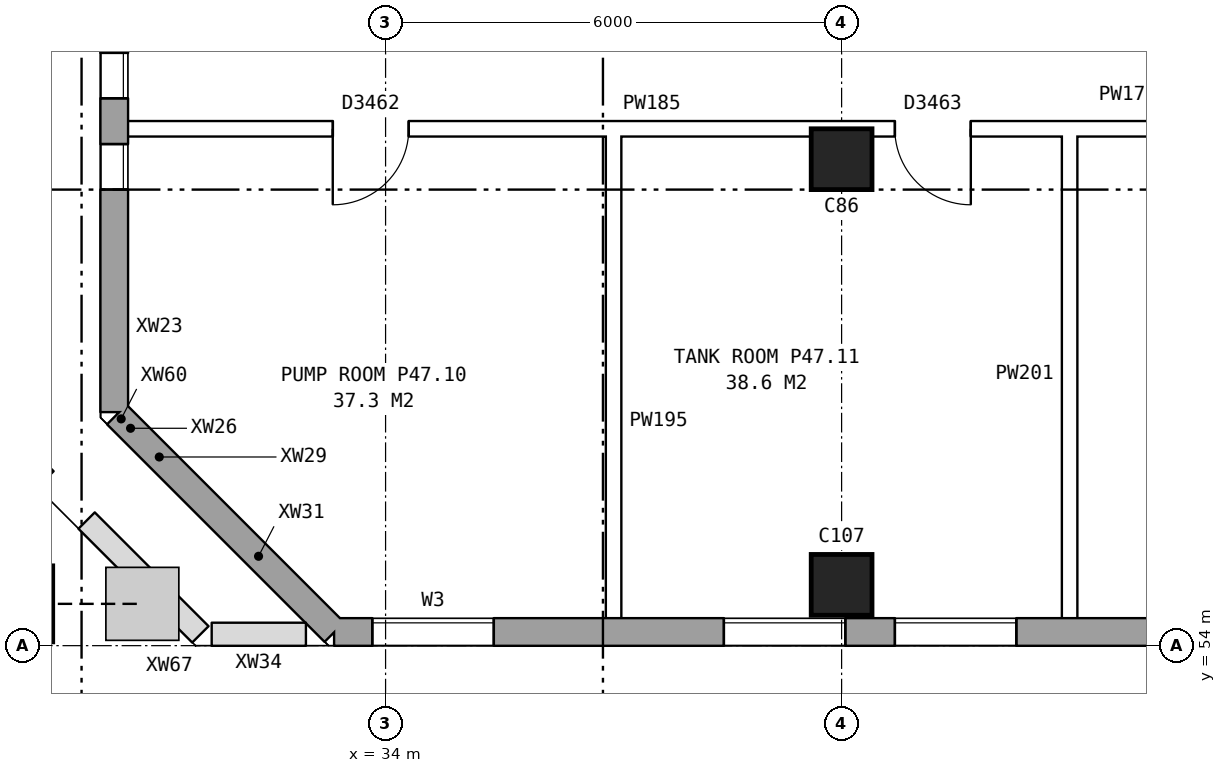
"""IFC4 building model, lengths in metres.
Left out: names, types, materials, properties, quantities, classifications, styles, units other than length and angle.
Written with IfcOpenShell. Run it as: python <this file> out.ifc"""

import sys

from ifc_helpers import new_model, si_unit, direction, frame, frame_2d, origin, origin_2d, place, context, subcontext, project, spatial, rectangle, hollow_rectangle, extrude, element, fill, save


model = new_model("IFC4")
c1 = context("Model", 3, precision=1e-05, world=origin(), true_north=direction((0.0, 1.0)))
c2 = subcontext(c1, "Body", "Model", "MODEL_VIEW")
j1 = project(units=[si_unit("LENGTHUNIT", "METRE"), si_unit("PLANEANGLEUNIT", "RADIAN")], contexts=[c1])
p1 = place(None, origin())
s1 = spatial("IfcSite", under=j1, at=p1, CompositionType="ELEMENT")
p2 = place(p1, origin())
s2 = spatial("IfcBuilding", under=s1, at=p2, CompositionType="ELEMENT")
p3 = place(p2, frame((0.0, 0.0, 167.1)))
s3 = spatial("IfcBuildingStorey", under=s2, at=p3, CompositionType="ELEMENT", Elevation=167.1)
for number, where, z_axis, x_axis in (
    (1, (40.0, 54.8, 0.0), (0.0, 0.0, 1.0), (1.0, 0.0, 0.0)),
    (2, (40.0, 60.4, 0.0), (0.0, 0.0, 1.0), (1.0, 0.0, 0.0)),
):
    element("IfcColumn", number, at=place(p3, frame(where, z_axis=z_axis, x_axis=x_axis)), inside=s3, PredefinedType="COLUMN", context=c2, shape_type="SweptSolid", body=[
        extrude(rectangle(XDim=0.8, YDim=0.8, at=origin_2d()), origin(), (0.0, 0.0, 1.0), 4.2),
    ])
p4 = place(p3, frame((29.121, 54.55, 0.181), z_axis=(0.362422375457, 0.0, 0.932013960071), x_axis=(0.0, 1.0, 0.0)))
e3 = element("IfcColumn", 3, at=p4, inside=s3, PredefinedType="COLUMN", context=c2, shape_type="SweptSolid", body=[
    extrude(hollow_rectangle(XDim=1.0, YDim=1.0, WallThickness=0.055, at=origin_2d()), origin(), (0.0, 0.0, 1.0), 4.439),
])
p5 = place(p3, frame((30.465, 57.039, 0.953), z_axis=(0.0, 0.0, 1.0), x_axis=(0.707106781187, -0.707106781187, 0.0)))
e4 = element("IfcWall", 4, at=p5, inside=s3, PredefinedType="STANDARD", context=c2, shape_type="SweptSolid", body=[
    extrude(rectangle(XDim=0.158, YDim=0.36, at=frame_2d((0.079, 0.0))), origin(), (0.0, 0.0, 1.0), 3.247),
])
p6 = place(p3, frame((30.577, 56.927, 0.0), z_axis=(0.0, 0.0, 1.0), x_axis=(0.707106781187, -0.707106781187, 0.0)))
e5 = element("IfcWall", 5, at=p6, inside=s3, PredefinedType="STANDARD", context=c2, shape_type="SweptSolid", body=[
    extrude(rectangle(XDim=0.191, YDim=0.36, at=frame_2d((0.095, 0.0))), origin(), (0.0, 0.0, 1.0), 4.2),
])
p7 = place(p3, frame((30.712, 56.792, 0.0), z_axis=(0.0, 0.0, 1.0), x_axis=(0.707106781187, -0.707106781187, 0.0)))
e6 = element("IfcWall", 6, at=p7, inside=s3, PredefinedType="STANDARD", context=c2, shape_type="SweptSolid", body=[
    extrude(rectangle(XDim=0.878, YDim=0.36, at=frame_2d((0.439, 0.0))), origin(), (0.0, 0.0, 1.0), 3.397),
])
p8 = place(p3, frame((31.333, 56.172, 0.0), z_axis=(0.0, 0.0, 1.0), x_axis=(0.707106781187, -0.707106781187, 0.0)))
e7 = element("IfcWall", 7, at=p8, inside=s3, PredefinedType="STANDARD", context=c2, shape_type="SweptSolid", body=[
    extrude(rectangle(XDim=2.817, YDim=0.36, at=frame_2d((1.409, 0.0))), origin(), (0.0, 0.0, 1.0), 4.2),
])
p9 = place(p3, frame((33.325, 54.18, 0.0), z_axis=(0.0, 0.0, 1.0), x_axis=(1.0, 0.0, 0.0)))
e8 = element("IfcWall", 8, at=p9, inside=s3, PredefinedType="STANDARD", context=c2, shape_type="SweptSolid", body=[
    extrude(rectangle(XDim=39.601, YDim=0.36, at=frame_2d((19.8, 0.0))), origin(), (0.0, 0.0, 1.0), 4.2),
])
p10 = place(p9, frame((0.5, 0.0, 1.5)))
e9 = element("IfcOpeningElement", 9, at=p10, cuts=e8, PredefinedType="OPENING", context=c2, shape_type="SweptSolid", body=[
    extrude(rectangle(XDim=1.6, YDim=1.2, at=frame_2d((0.8, 0.6))), frame((0.0, 0.19, 0.0), z_axis=(0.0, -1.0, 0.0), x_axis=(1.0, 0.0, 0.0)), (0.0, 0.0, 1.0), 0.38),
])
p11 = place(p9, frame((5.125, 0.0, 1.5)))
e10 = element("IfcOpeningElement", 10, at=p11, cuts=e8, PredefinedType="OPENING", context=c2, shape_type="SweptSolid", body=[
    extrude(rectangle(XDim=1.6, YDim=1.2, at=frame_2d((0.8, 0.6))), frame((0.0, 0.19, 0.0), z_axis=(0.0, -1.0, 0.0), x_axis=(1.0, 0.0, 0.0)), (0.0, 0.0, 1.0), 0.38),
])
p12 = place(p9, frame((7.375, 0.0, 1.5)))
e11 = element("IfcOpeningElement", 11, at=p12, cuts=e8, PredefinedType="OPENING", context=c2, shape_type="SweptSolid", body=[
    extrude(rectangle(XDim=1.6, YDim=1.2, at=frame_2d((0.8, 0.6))), frame((0.0, 0.19, 0.0), z_axis=(0.0, -1.0, 0.0), x_axis=(1.0, 0.0, 0.0)), (0.0, 0.0, 1.0), 0.38),
])
p13 = place(p9, frame((12.125, 0.0, 1.5)))
e12 = element("IfcOpeningElement", 12, at=p13, cuts=e8, PredefinedType="OPENING", context=c2, shape_type="SweptSolid", body=[
    extrude(rectangle(XDim=1.6, YDim=1.2, at=frame_2d((0.8, 0.6))), frame((0.0, 0.19, 0.0), z_axis=(0.0, -1.0, 0.0), x_axis=(1.0, 0.0, 0.0)), (0.0, 0.0, 1.0), 0.38),
])
p14 = place(p9, frame((18.275, 0.0, 1.5)))
e13 = element("IfcOpeningElement", 13, at=p14, cuts=e8, PredefinedType="OPENING", context=c2, shape_type="SweptSolid", body=[
    extrude(rectangle(XDim=0.6, YDim=1.2, at=frame_2d((0.3, 0.6))), frame((0.0, 0.19, 0.0), z_axis=(0.0, -1.0, 0.0), x_axis=(1.0, 0.0, 0.0)), (0.0, 0.0, 1.0), 0.38),
])
p15 = place(p9, frame((16.375, 0.0, 1.5)))
e14 = element("IfcOpeningElement", 14, at=p15, cuts=e8, PredefinedType="OPENING", context=c2, shape_type="SweptSolid", body=[
    extrude(rectangle(XDim=1.6, YDim=1.2, at=frame_2d((0.8, 0.6))), frame((0.0, 0.19, 0.0), z_axis=(0.0, -1.0, 0.0), x_axis=(1.0, 0.0, 0.0)), (0.0, 0.0, 1.0), 0.38),
])
p16 = place(p9, frame((19.375, 0.0, 1.5)))
e15 = element("IfcOpeningElement", 15, at=p16, cuts=e8, PredefinedType="OPENING", context=c2, shape_type="SweptSolid", body=[
    extrude(rectangle(XDim=1.6, YDim=1.2, at=frame_2d((0.8, 0.6))), frame((0.0, 0.19, 0.0), z_axis=(0.0, -1.0, 0.0), x_axis=(1.0, 0.0, 0.0)), (0.0, 0.0, 1.0), 0.38),
])
p17 = place(p9, frame((23.725, 0.0, 1.5)))
e16 = element("IfcOpeningElement", 16, at=p17, cuts=e8, PredefinedType="OPENING", context=c2, shape_type="SweptSolid", body=[
    extrude(rectangle(XDim=1.6, YDim=1.2, at=frame_2d((0.8, 0.6))), frame((0.0, 0.19, 0.0), z_axis=(0.0, -1.0, 0.0), x_axis=(1.0, 0.0, 0.0)), (0.0, 0.0, 1.0), 0.38),
])
p18 = place(p9, frame((28.375, 0.0, 1.5)))
e17 = element("IfcOpeningElement", 17, at=p18, cuts=e8, PredefinedType="OPENING", context=c2, shape_type="SweptSolid", body=[
    extrude(rectangle(XDim=1.6, YDim=1.2, at=frame_2d((0.8, 0.6))), frame((0.0, 0.19, 0.0), z_axis=(0.0, -1.0, 0.0), x_axis=(1.0, 0.0, 0.0)), (0.0, 0.0, 1.0), 0.38),
])
p19 = place(p9, frame((31.375, 0.0, 1.5)))
e18 = element("IfcOpeningElement", 18, at=p19, cuts=e8, PredefinedType="OPENING", context=c2, shape_type="SweptSolid", body=[
    extrude(rectangle(XDim=1.6, YDim=1.2, at=frame_2d((0.8, 0.6))), frame((0.0, 0.19, 0.0), z_axis=(0.0, -1.0, 0.0), x_axis=(1.0, 0.0, 0.0)), (0.0, 0.0, 1.0), 0.38),
])
p20 = place(p9, frame((35.325, 0.0, 1.5)))
e19 = element("IfcOpeningElement", 19, at=p20, cuts=e8, PredefinedType="OPENING", context=c2, shape_type="SweptSolid", body=[
    extrude(rectangle(XDim=0.9, YDim=1.2, at=frame_2d((0.45, 0.6))), frame((0.0, 0.19, 0.0), z_axis=(0.0, -1.0, 0.0), x_axis=(1.0, 0.0, 0.0)), (0.0, 0.0, 1.0), 0.38),
])
p21 = place(p3, frame((30.43, 81.245, 0.0), z_axis=(0.0, 0.0, 1.0), x_axis=(0.0, -1.0, 0.0)))
e20 = element("IfcWall", 20, at=p21, inside=s3, PredefinedType="STANDARD", context=c2, shape_type="SweptSolid", body=[
    extrude(rectangle(XDim=22.489, YDim=0.36, at=frame_2d((11.245, 0.0))), origin(), (0.0, 0.0, 1.0), 4.2),
])
p22 = place(p21, frame((1.245, 0.0, 1.5)))
e21 = element("IfcOpeningElement", 21, at=p22, cuts=e20, PredefinedType="OPENING", context=c2, shape_type="SweptSolid", body=[
    extrude(rectangle(XDim=0.6, YDim=1.2, at=frame_2d((0.3, 0.6))), frame((0.0, 0.19, 0.0), z_axis=(0.0, -1.0, 0.0), x_axis=(1.0, 0.0, 0.0)), (0.0, 0.0, 1.0), 0.38),
])
p23 = place(p21, frame((2.945, 0.0, 1.5)))
e22 = element("IfcOpeningElement", 22, at=p23, cuts=e20, PredefinedType="OPENING", context=c2, shape_type="SweptSolid", body=[
    extrude(rectangle(XDim=1.6, YDim=1.2, at=frame_2d((0.8, 0.6))), frame((0.0, 0.19, 0.0), z_axis=(0.0, -1.0, 0.0), x_axis=(1.0, 0.0, 0.0)), (0.0, 0.0, 1.0), 0.38),
])
p24 = place(p21, frame((7.095, 0.0, 1.5)))
e23 = element("IfcOpeningElement", 23, at=p24, cuts=e20, PredefinedType="OPENING", context=c2, shape_type="SweptSolid", body=[
    extrude(rectangle(XDim=0.6, YDim=1.2, at=frame_2d((0.3, 0.6))), frame((0.0, 0.19, 0.0), z_axis=(0.0, -1.0, 0.0), x_axis=(1.0, 0.0, 0.0)), (0.0, 0.0, 1.0), 0.38),
])
p25 = place(p21, frame((7.995, 0.0, 1.5)))
e24 = element("IfcOpeningElement", 24, at=p25, cuts=e20, PredefinedType="OPENING", context=c2, shape_type="SweptSolid", body=[
    extrude(rectangle(XDim=1.2, YDim=1.2, at=frame_2d((0.6, 0.6))), frame((0.0, 0.19, 0.0), z_axis=(0.0, -1.0, 0.0), x_axis=(1.0, 0.0, 0.0)), (0.0, 0.0, 1.0), 0.38),
])
p26 = place(p21, frame((11.945, 0.0, 1.5)))
e25 = element("IfcOpeningElement", 25, at=p26, cuts=e20, PredefinedType="OPENING", context=c2, shape_type="SweptSolid", body=[
    extrude(rectangle(XDim=1.6, YDim=1.2, at=frame_2d((0.8, 0.6))), frame((0.0, 0.19, 0.0), z_axis=(0.0, -1.0, 0.0), x_axis=(1.0, 0.0, 0.0)), (0.0, 0.0, 1.0), 0.38),
])
p27 = place(p21, frame((14.945, 0.0, 1.5)))
e26 = element("IfcOpeningElement", 26, at=p27, cuts=e20, PredefinedType="OPENING", context=c2, shape_type="SweptSolid", body=[
    extrude(rectangle(XDim=1.6, YDim=1.2, at=frame_2d((0.8, 0.6))), frame((0.0, 0.19, 0.0), z_axis=(0.0, -1.0, 0.0), x_axis=(1.0, 0.0, 0.0)), (0.0, 0.0, 1.0), 0.38),
])
p28 = place(p21, frame((13.845, 0.0, 1.5)))
e27 = element("IfcOpeningElement", 27, at=p28, cuts=e20, PredefinedType="OPENING", context=c2, shape_type="SweptSolid", body=[
    extrude(rectangle(XDim=0.6, YDim=1.2, at=frame_2d((0.3, 0.6))), frame((0.0, 0.19, 0.0), z_axis=(0.0, -1.0, 0.0), x_axis=(1.0, 0.0, 0.0)), (0.0, 0.0, 1.0), 0.38),
])
p29 = place(p21, frame((20.645, 0.0, 1.5)))
e28 = element("IfcOpeningElement", 28, at=p29, cuts=e20, PredefinedType="OPENING", context=c2, shape_type="SweptSolid", body=[
    extrude(rectangle(XDim=0.6, YDim=1.2, at=frame_2d((0.3, 0.6))), frame((0.0, 0.19, 0.0), z_axis=(0.0, -1.0, 0.0), x_axis=(1.0, 0.0, 0.0)), (0.0, 0.0, 1.0), 0.38),
])
p30 = place(p21, frame((16.845, 0.0, 1.5)))
e29 = element("IfcOpeningElement", 29, at=p30, cuts=e20, PredefinedType="OPENING", context=c2, shape_type="SweptSolid", body=[
    extrude(rectangle(XDim=0.6, YDim=1.2, at=frame_2d((0.3, 0.6))), frame((0.0, 0.19, 0.0), z_axis=(0.0, -1.0, 0.0), x_axis=(1.0, 0.0, 0.0)), (0.0, 0.0, 1.0), 0.38),
])
p31 = place(p21, frame((19.445, 0.0, 1.5)))
e30 = element("IfcOpeningElement", 30, at=p31, cuts=e20, PredefinedType="OPENING", context=c2, shape_type="SweptSolid", body=[
    extrude(rectangle(XDim=0.6, YDim=1.2, at=frame_2d((0.3, 0.6))), frame((0.0, 0.19, 0.0), z_axis=(0.0, -1.0, 0.0), x_axis=(1.0, 0.0, 0.0)), (0.0, 0.0, 1.0), 0.38),
])
p32 = place(p3, frame((30.43, 58.755, 0.953), z_axis=(0.0, 0.0, 1.0), x_axis=(0.0, -1.0, 0.0)))
e31 = element("IfcWall", 31, at=p32, inside=s3, PredefinedType="STANDARD", context=c2, shape_type="SweptSolid", body=[
    extrude(rectangle(XDim=1.681, YDim=0.36, at=frame_2d((0.84, 0.0))), origin(), (0.0, 0.0, 1.0), 3.247),
])
p33 = place(p3, frame((28.898, 56.814, 0.0), z_axis=(0.0, 0.0, 1.0), x_axis=(0.707106781187, -0.707106781187, 0.0)))
e32 = element("IfcWall", 32, at=p33, inside=s3, PredefinedType="PARAPET", context=c2, shape_type="SweptSolid", body=[
    extrude(rectangle(XDim=0.885, YDim=0.3, at=frame_2d((0.442, 0.0))), origin(), (0.0, 0.0, 1.0), 1.1),
])
p34 = place(p3, frame((30.068, 55.644, 0.0), z_axis=(0.0, 0.0, 1.0), x_axis=(0.707106781187, -0.707106781187, 0.0)))
e33 = element("IfcWall", 33, at=p34, inside=s3, PredefinedType="PARAPET", context=c2, shape_type="SweptSolid", body=[
    extrude(rectangle(XDim=2.113, YDim=0.3, at=frame_2d((1.057, 0.0))), origin(), (0.0, 0.0, 1.0), 1.1),
])
p35 = place(p3, frame((31.714, 54.15, 0.0), z_axis=(0.0, 0.0, 1.0), x_axis=(1.0, 0.0, 0.0)))
e34 = element("IfcWall", 34, at=p35, inside=s3, PredefinedType="PARAPET", context=c2, shape_type="SweptSolid", body=[
    extrude(rectangle(XDim=1.236, YDim=0.3, at=frame_2d((0.618, 0.0))), origin(), (0.0, 0.0, 1.0), 1.1),
])
p36 = place(p3, frame((30.49, 60.8, 0.0), z_axis=(0.0, 0.0, 1.0), x_axis=(1.0, 0.0, 0.0)))
e35 = element("IfcWall", 35, at=p36, inside=s3, PredefinedType="PARTITIONING", context=c2, shape_type="SweptSolid", body=[
    extrude(rectangle(XDim=13.97, YDim=0.2, at=frame_2d((6.985, 0.0))), origin(), (0.0, 0.0, 1.0), 4.2),
])
p37 = place(p36, frame((2.815, 0.0, 0.0)))
e36 = element("IfcOpeningElement", 36, at=p37, cuts=e35, PredefinedType="OPENING", context=c2, shape_type="SweptSolid", body=[
    extrude(rectangle(XDim=1.0, YDim=2.1, at=frame_2d((0.5, 1.05))), frame((0.0, 0.11, 0.0), z_axis=(0.0, -1.0, 0.0), x_axis=(1.0, 0.0, 0.0)), (0.0, 0.0, 1.0), 0.22),
])
p38 = place(p36, frame((10.21, 0.0, 0.0)))
e37 = element("IfcOpeningElement", 37, at=p38, cuts=e35, PredefinedType="OPENING", context=c2, shape_type="SweptSolid", body=[
    extrude(rectangle(XDim=1.0, YDim=2.1, at=frame_2d((0.5, 1.05))), frame((0.0, 0.11, 0.0), z_axis=(0.0, -1.0, 0.0), x_axis=(1.0, 0.0, 0.0)), (0.0, 0.0, 1.0), 0.22),
])
for number, where, z_axis, x_axis in (
    (38, (37.0, 54.24, 0.0), (0.0, 0.0, 1.0), (0.0, 1.0, 0.0)),
    (39, (43.0, 54.24, 0.0), (0.0, 0.0, 1.0), (0.0, 1.0, 0.0)),
):
    element("IfcWall", number, at=place(p3, frame(where, z_axis=z_axis, x_axis=x_axis)), inside=s3, PredefinedType="PARTITIONING", context=c2, shape_type="SweptSolid", body=[
        extrude(rectangle(XDim=6.66, YDim=0.2, at=frame_2d((3.33, 0.0))), origin(), (0.0, 0.0, 1.0), 4.2),
    ])
p39 = place(p10, origin())
e40 = element("IfcWindow", 40, at=p39, inside=s3, PartitioningType="DOUBLE_PANEL_HORIZONTAL", PredefinedType="WINDOW", context=c2, shape_type="SweptSolid", body=[
    extrude(rectangle(XDim=1.6, YDim=1.2, at=frame_2d((0.8, 0.6))), frame((0.0, 0.15, 0.0), z_axis=(0.0, -1.0, 0.0), x_axis=(1.0, 0.0, 0.0)), (0.0, 0.0, 1.0), 0.06),
])
fill(e9, e40)
p40 = place(p11, origin())
e41 = element("IfcWindow", 41, at=p40, inside=s3, PartitioningType="DOUBLE_PANEL_HORIZONTAL", PredefinedType="WINDOW", context=c2, shape_type="SweptSolid", body=[
    extrude(rectangle(XDim=1.6, YDim=1.2, at=frame_2d((0.8, 0.6))), frame((0.0, 0.15, 0.0), z_axis=(0.0, -1.0, 0.0), x_axis=(1.0, 0.0, 0.0)), (0.0, 0.0, 1.0), 0.06),
])
fill(e10, e41)
p41 = place(p12, origin())
e42 = element("IfcWindow", 42, at=p41, inside=s3, PartitioningType="DOUBLE_PANEL_HORIZONTAL", PredefinedType="WINDOW", context=c2, shape_type="SweptSolid", body=[
    extrude(rectangle(XDim=1.6, YDim=1.2, at=frame_2d((0.8, 0.6))), frame((0.0, 0.15, 0.0), z_axis=(0.0, -1.0, 0.0), x_axis=(1.0, 0.0, 0.0)), (0.0, 0.0, 1.0), 0.06),
])
fill(e11, e42)
p42 = place(p29, origin())
e43 = element("IfcWindow", 43, at=p42, inside=s3, PartitioningType="DOUBLE_PANEL_HORIZONTAL", PredefinedType="WINDOW", context=c2, shape_type="SweptSolid", body=[
    extrude(rectangle(XDim=0.6, YDim=1.2, at=frame_2d((0.3, 0.6))), frame((0.0, 0.15, 0.0), z_axis=(0.0, -1.0, 0.0), x_axis=(1.0, 0.0, 0.0)), (0.0, 0.0, 1.0), 0.06),
])
fill(e28, e43)
p43 = place(p37, frame((1.0, 0.0, 0.0), z_axis=(0.0, 0.0, 1.0), x_axis=(-1.0, 0.0, 0.0)))
e44 = element("IfcDoor", 44, at=p43, inside=s3, OperationType="SINGLE_SWING_RIGHT", PredefinedType="DOOR", context=c2, shape_type="SweptSolid", body=[
    extrude(rectangle(XDim=1.0, YDim=2.1, at=frame_2d((0.5, 1.05))), frame((0.0, 0.025, 0.0), z_axis=(0.0, -1.0, 0.0), x_axis=(1.0, 0.0, 0.0)), (0.0, 0.0, 1.0), 0.05),
])
fill(e36, e44)
p44 = place(p38, frame((1.0, 0.0, 0.0), z_axis=(0.0, 0.0, 1.0), x_axis=(-1.0, 0.0, 0.0)))
e45 = element("IfcDoor", 45, at=p44, inside=s3, OperationType="SINGLE_SWING_LEFT", PredefinedType="DOOR", context=c2, shape_type="SweptSolid", body=[
    extrude(rectangle(XDim=1.0, YDim=2.1, at=frame_2d((0.5, 1.05))), frame((0.0, 0.025, 0.0), z_axis=(0.0, -1.0, 0.0), x_axis=(1.0, 0.0, 0.0)), (0.0, 0.0, 1.0), 0.05),
])
fill(e37, e45)
p45 = place(p31, origin())
e46 = element("IfcWindow", 46, at=p45, inside=s3, PartitioningType="DOUBLE_PANEL_HORIZONTAL", PredefinedType="WINDOW", context=c2, shape_type="SweptSolid", body=[
    extrude(rectangle(XDim=0.6, YDim=1.2, at=frame_2d((0.3, 0.6))), frame((0.0, 0.15, 0.0), z_axis=(0.0, -1.0, 0.0), x_axis=(1.0, 0.0, 0.0)), (0.0, 0.0, 1.0), 0.06),
])
fill(e30, e46)
save(model, sys.argv[1])
